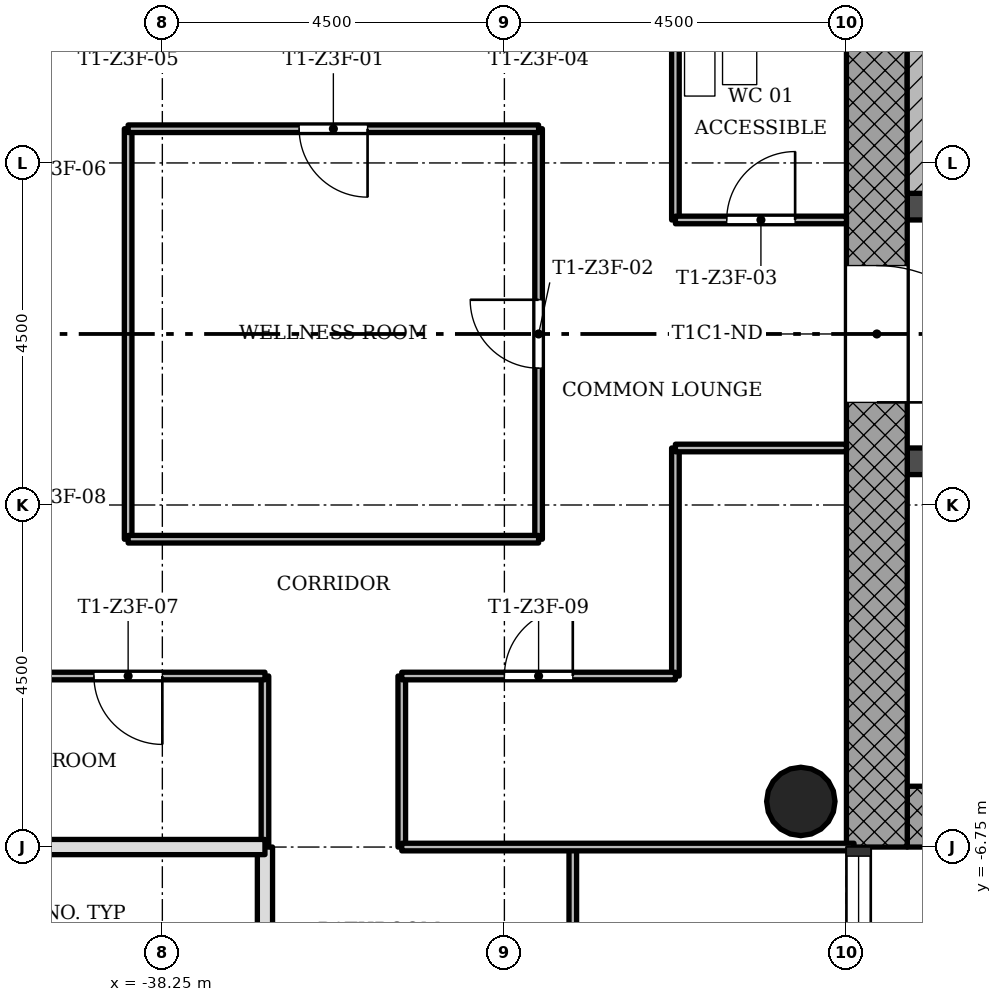
"""IFC4 building model, lengths in metres.
Left out: names, types, materials, properties, quantities, classifications, styles, units other than length and angle.
Written with IfcOpenShell. Run it as: python <this file> out.ifc"""

import sys

from ifc_helpers import new_model, si_unit, direction, frame, frame_2d, origin, origin_2d, place, context, subcontext, project, spatial, rectangle, hollow_circle, extrude, element, fill, save


model = new_model("IFC4")
c1 = context("Model", 3, precision=1e-05, world=origin(), true_north=direction((0.0, 1.0)))
c2 = subcontext(c1, "Body", "Model", "MODEL_VIEW")
j1 = project(units=[si_unit("LENGTHUNIT", "METRE"), si_unit("PLANEANGLEUNIT", "RADIAN")], contexts=[c1])
p1 = place(None, origin())
s1 = spatial("IfcSite", under=j1, at=p1, CompositionType="ELEMENT")
p2 = place(p1, origin())
s2 = spatial("IfcBuilding", under=s1, at=p2, CompositionType="ELEMENT")
p3 = place(p2, frame((0.0, 0.0, 164.3)))
s3 = spatial("IfcBuildingStorey", under=s2, at=p3, CompositionType="ELEMENT", Elevation=164.3)
p4 = place(p3, frame((-28.45, -6.35, 0.0), z_axis=(0.0, 0.0, 1.0), x_axis=(1.0, 0.0, 0.0)))
e1 = element("IfcWall", 1, at=p4, inside=s3, PredefinedType="SHEAR", context=c2, shape_type="SweptSolid", body=[
    extrude(rectangle(XDim=8.2, YDim=0.8, at=frame_2d((4.1, 0.0))), origin(), (0.0, 0.0, 1.0), 3.4),
])
p5 = place(p3, frame((-28.85, 5.95, 0.0), z_axis=(0.0, 0.0, 1.0), x_axis=(0.0, -1.0, 0.0)))
e2 = element("IfcWall", 2, at=p5, inside=s3, PredefinedType="SHEAR", context=c2, shape_type="SweptSolid", body=[
    extrude(rectangle(XDim=12.7, YDim=0.8, at=frame_2d((6.35, 0.0))), origin(), (0.0, 0.0, 1.0), 3.4),
])
p6 = place(p5, frame((5.05, 0.0, 0.0)))
e3 = element("IfcOpeningElement", 3, at=p6, cuts=e2, PredefinedType="OPENING", context=c2, shape_type="SweptSolid", body=[
    extrude(rectangle(XDim=1.8, YDim=2.1, at=frame_2d((0.9, 1.05))), frame((0.0, 0.41, 0.0), z_axis=(0.0, -1.0, 0.0), x_axis=(1.0, 0.0, 0.0)), (0.0, 0.0, 1.0), 0.82),
])
p7 = place(p3, frame((-28.45, -1.675, 0.0), z_axis=(0.0, 0.0, 1.0), x_axis=(1.0, 0.0, 0.0)))
e4 = element("IfcWall", 4, at=p7, inside=s3, PredefinedType="SHEAR", context=c2, shape_type="SweptSolid", body=[
    extrude(rectangle(XDim=7.4, YDim=0.35, at=frame_2d((3.7, 0.0))), origin(), (0.0, 0.0, 1.0), 3.4),
])
p8 = place(p7, frame((0.95, 0.0, 0.0)))
e5 = element("IfcOpeningElement", 5, at=p8, cuts=e4, PredefinedType="OPENING", context=c2, shape_type="SweptSolid", body=[
    extrude(rectangle(XDim=1.1, YDim=2.1, at=frame_2d((0.55, 1.05))), frame((0.0, 0.185, 0.0), z_axis=(0.0, -1.0, 0.0), x_axis=(1.0, 0.0, 0.0)), (0.0, 0.0, 1.0), 0.37),
])
p9 = place(p7, frame((3.15, 0.0, 0.0)))
e6 = element("IfcOpeningElement", 6, at=p9, cuts=e4, PredefinedType="OPENING", context=c2, shape_type="SweptSolid", body=[
    extrude(rectangle(XDim=1.1, YDim=2.1, at=frame_2d((0.55, 1.05))), frame((0.0, 0.185, 0.0), z_axis=(0.0, -1.0, 0.0), x_axis=(1.0, 0.0, 0.0)), (0.0, 0.0, 1.0), 0.37),
])
p10 = place(p7, frame((5.35, 0.0, 0.0)))
e7 = element("IfcOpeningElement", 7, at=p10, cuts=e4, PredefinedType="OPENING", context=c2, shape_type="SweptSolid", body=[
    extrude(rectangle(XDim=1.1, YDim=2.1, at=frame_2d((0.55, 1.05))), frame((0.0, 0.185, 0.0), z_axis=(0.0, -1.0, 0.0), x_axis=(1.0, 0.0, 0.0)), (0.0, 0.0, 1.0), 0.37),
])
p11 = place(p3, frame((-28.45, 1.675, 0.0), z_axis=(0.0, 0.0, 1.0), x_axis=(1.0, 0.0, 0.0)))
e8 = element("IfcWall", 8, at=p11, inside=s3, PredefinedType="SHEAR", context=c2, shape_type="SweptSolid", body=[
    extrude(rectangle(XDim=7.4, YDim=0.35, at=frame_2d((3.7, 0.0))), origin(), (0.0, 0.0, 1.0), 3.4),
])
p12 = place(p11, frame((0.85, 0.0, 0.0)))
e9 = element("IfcOpeningElement", 9, at=p12, cuts=e8, PredefinedType="OPENING", context=c2, shape_type="SweptSolid", body=[
    extrude(rectangle(XDim=0.9, YDim=2.1, at=frame_2d((0.45, 1.05))), frame((0.0, 0.185, 0.0), z_axis=(0.0, -1.0, 0.0), x_axis=(1.0, 0.0, 0.0)), (0.0, 0.0, 1.0), 0.37),
])
p13 = place(p3, frame((-29.85, -6.15, 0.0), z_axis=(0.0, 0.0, 1.0), x_axis=(1.0, 0.0, 0.0)))
e10 = element("IfcColumn", 10, at=p13, inside=s3, PredefinedType="COLUMN", context=c2, shape_type="SweptSolid", body=[
    extrude(hollow_circle(Radius=0.45, WallThickness=0.032, at=origin_2d()), origin(), (0.0, 0.0, 1.0), 3.4),
])
p14 = place(p3, frame((-38.7, -2.7, 0.0), z_axis=(0.0, 0.0, 1.0), x_axis=(0.0, 1.0, 0.0)))
e11 = element("IfcWall", 11, at=p14, inside=s3, PredefinedType="PARTITIONING", context=c2, shape_type="SweptSolid", body=[
    extrude(rectangle(XDim=5.4, YDim=0.1, at=frame_2d((2.7, 0.0))), origin(), (0.0, 0.0, 1.0), 3.0),
])
p15 = place(p3, frame((-36.9, -6.75, 0.0), z_axis=(0.0, 0.0, 1.0), x_axis=(0.0, 1.0, 0.0)))
e12 = element("IfcWall", 12, at=p15, inside=s3, PredefinedType="PARTITIONING", context=c2, shape_type="SweptSolid", body=[
    extrude(rectangle(XDim=2.25, YDim=0.1, at=frame_2d((1.125, 0.0))), origin(), (0.0, 0.0, 1.0), 3.0),
])
p16 = place(p3, frame((-36.9, -8.55, 0.0), z_axis=(0.0, 0.0, 1.0), x_axis=(0.0, 1.0, 0.0)))
e13 = element("IfcWall", 13, at=p16, inside=s3, PredefinedType="SOLIDWALL", context=c2, shape_type="SweptSolid", body=[
    extrude(rectangle(XDim=1.8, YDim=0.2, at=frame_2d((0.9, 0.0))), origin(), (0.0, 0.0, 1.0), 3.0),
])
p17 = place(p3, frame((-35.1, -6.75, 0.0), z_axis=(0.0, 0.0, 1.0), x_axis=(0.0, 1.0, 0.0)))
e14 = element("IfcWall", 14, at=p17, inside=s3, PredefinedType="PARTITIONING", context=c2, shape_type="SweptSolid", body=[
    extrude(rectangle(XDim=2.25, YDim=0.1, at=frame_2d((1.125, 0.0))), origin(), (0.0, 0.0, 1.0), 3.0),
])
p18 = place(p3, frame((-33.3, -2.7, 0.0), z_axis=(0.0, 0.0, 1.0), x_axis=(0.0, 1.0, 0.0)))
e15 = element("IfcWall", 15, at=p18, inside=s3, PredefinedType="PARTITIONING", context=c2, shape_type="SweptSolid", body=[
    extrude(rectangle(XDim=5.4, YDim=0.1, at=frame_2d((2.7, 0.0))), origin(), (0.0, 0.0, 1.0), 3.0),
])
p19 = place(p18, frame((2.25, 0.0, 0.0)))
e16 = element("IfcOpeningElement", 16, at=p19, cuts=e15, PredefinedType="OPENING", context=c2, shape_type="SweptSolid", body=[
    extrude(rectangle(XDim=0.9, YDim=2.1, at=frame_2d((0.45, 1.05))), frame((0.0, 0.06, 0.0), z_axis=(0.0, -1.0, 0.0), x_axis=(1.0, 0.0, 0.0)), (0.0, 0.0, 1.0), 0.12),
])
p20 = place(p3, frame((-32.85, -15.75, 0.0), z_axis=(0.0, 0.0, 1.0), x_axis=(0.0, 1.0, 0.0)))
e17 = element("IfcWall", 17, at=p20, inside=s3, PredefinedType="PARTITIONING", context=c2, shape_type="SweptSolid", body=[
    extrude(rectangle(XDim=9.0, YDim=0.1, at=frame_2d((4.5, 0.0))), origin(), (0.0, 0.0, 1.0), 3.0),
])
p21 = place(p20, frame((6.3, 0.0, 0.0)))
e18 = element("IfcOpeningElement", 18, at=p21, cuts=e17, PredefinedType="OPENING", context=c2, shape_type="SweptSolid", body=[
    extrude(rectangle(XDim=0.9, YDim=2.1, at=frame_2d((0.45, 1.05))), frame((0.0, 0.06, 0.0), z_axis=(0.0, -1.0, 0.0), x_axis=(1.0, 0.0, 0.0)), (0.0, 0.0, 1.0), 0.12),
])
p22 = place(p20, frame((1.8, 0.0, 0.0)))
e19 = element("IfcOpeningElement", 19, at=p22, cuts=e17, PredefinedType="OPENING", context=c2, shape_type="SweptSolid", body=[
    extrude(rectangle(XDim=0.9, YDim=2.1, at=frame_2d((0.45, 1.05))), frame((0.0, 0.06, 0.0), z_axis=(0.0, -1.0, 0.0), x_axis=(1.0, 0.0, 0.0)), (0.0, 0.0, 1.0), 0.12),
])
for number, where, z_axis, x_axis in (
    (20, (-31.5, -4.5, 0.0), (0.0, 0.0, 1.0), (0.0, 1.0, 0.0)),
    (21, (-31.5, 1.5, 0.0), (0.0, 0.0, 1.0), (0.0, 1.0, 0.0)),
):
    element("IfcWall", number, at=place(p3, frame(where, z_axis=z_axis, x_axis=x_axis)), inside=s3, PredefinedType="PARTITIONING", context=c2, shape_type="SweptSolid", body=[
        extrude(rectangle(XDim=3.0, YDim=0.1, at=frame_2d((1.5, 0.0))), origin(), (0.0, 0.0, 1.0), 3.0),
    ])
p23 = place(p3, frame((-35.1, -6.75, 0.0), z_axis=(0.0, 0.0, 1.0), x_axis=(1.0, 0.0, 0.0)))
e22 = element("IfcWall", 22, at=p23, inside=s3, PredefinedType="PARTITIONING", context=c2, shape_type="SweptSolid", body=[
    extrude(rectangle(XDim=5.95, YDim=0.1, at=frame_2d((2.975, 0.0))), origin(), (0.0, 0.0, 1.0), 3.0),
])
p24 = place(p3, frame((-42.85, -6.75, 0.0), z_axis=(0.0, 0.0, 1.0), x_axis=(1.0, 0.0, 0.0)))
e23 = element("IfcWall", 23, at=p24, inside=s3, PredefinedType="SOLIDWALL", context=c2, shape_type="SweptSolid", body=[
    extrude(rectangle(XDim=5.95, YDim=0.2, at=frame_2d((2.975, 0.0))), origin(), (0.0, 0.0, 1.0), 3.0),
])
p25 = place(p3, frame((-42.75, -4.5, 0.0), z_axis=(0.0, 0.0, 1.0), x_axis=(1.0, 0.0, 0.0)))
e24 = element("IfcWall", 24, at=p25, inside=s3, PredefinedType="PARTITIONING", context=c2, shape_type="SweptSolid", body=[
    extrude(rectangle(XDim=5.85, YDim=0.1, at=frame_2d((2.925, 0.0))), origin(), (0.0, 0.0, 1.0), 3.0),
])
p26 = place(p25, frame((3.6, 0.0, 0.0)))
e25 = element("IfcOpeningElement", 25, at=p26, cuts=e24, PredefinedType="OPENING", context=c2, shape_type="SweptSolid", body=[
    extrude(rectangle(XDim=0.9, YDim=2.1, at=frame_2d((0.45, 1.05))), frame((0.0, 0.06, 0.0), z_axis=(0.0, -1.0, 0.0), x_axis=(1.0, 0.0, 0.0)), (0.0, 0.0, 1.0), 0.12),
])
p27 = place(p3, frame((-35.1, -4.5, 0.0), z_axis=(0.0, 0.0, 1.0), x_axis=(1.0, 0.0, 0.0)))
e26 = element("IfcWall", 26, at=p27, inside=s3, PredefinedType="PARTITIONING", context=c2, shape_type="SweptSolid", body=[
    extrude(rectangle(XDim=3.6, YDim=0.1, at=frame_2d((1.8, 0.0))), origin(), (0.0, 0.0, 1.0), 3.0),
])
p28 = place(p27, frame((1.35, 0.0, 0.0)))
e27 = element("IfcOpeningElement", 27, at=p28, cuts=e26, PredefinedType="OPENING", context=c2, shape_type="SweptSolid", body=[
    extrude(rectangle(XDim=0.9, YDim=2.1, at=frame_2d((0.45, 1.05))), frame((0.0, 0.06, 0.0), z_axis=(0.0, -1.0, 0.0), x_axis=(1.0, 0.0, 0.0)), (0.0, 0.0, 1.0), 0.12),
])
p29 = place(p3, frame((-38.7, -2.7, 0.0), z_axis=(0.0, 0.0, 1.0), x_axis=(1.0, 0.0, 0.0)))
e28 = element("IfcWall", 28, at=p29, inside=s3, PredefinedType="PARTITIONING", context=c2, shape_type="SweptSolid", body=[
    extrude(rectangle(XDim=5.4, YDim=0.1, at=frame_2d((2.7, 0.0))), origin(), (0.0, 0.0, 1.0), 3.0),
])
p30 = place(p3, frame((-31.5, -1.5, 0.0), z_axis=(0.0, 0.0, 1.0), x_axis=(1.0, 0.0, 0.0)))
e29 = element("IfcWall", 29, at=p30, inside=s3, PredefinedType="PARTITIONING", context=c2, shape_type="SweptSolid", body=[
    extrude(rectangle(XDim=2.25, YDim=0.1, at=frame_2d((1.125, 0.0))), origin(), (0.0, 0.0, 1.0), 3.0),
])
p31 = place(p3, frame((-31.5, 1.5, 0.0), z_axis=(0.0, 0.0, 1.0), x_axis=(1.0, 0.0, 0.0)))
e30 = element("IfcWall", 30, at=p31, inside=s3, PredefinedType="PARTITIONING", context=c2, shape_type="SweptSolid", body=[
    extrude(rectangle(XDim=2.25, YDim=0.1, at=frame_2d((1.125, 0.0))), origin(), (0.0, 0.0, 1.0), 3.0),
])
p32 = place(p31, frame((0.675, 0.0, 0.0)))
e31 = element("IfcOpeningElement", 31, at=p32, cuts=e30, PredefinedType="OPENING", context=c2, shape_type="SweptSolid", body=[
    extrude(rectangle(XDim=0.9, YDim=2.1, at=frame_2d((0.45, 1.05))), frame((0.0, 0.06, 0.0), z_axis=(0.0, -1.0, 0.0), x_axis=(1.0, 0.0, 0.0)), (0.0, 0.0, 1.0), 0.12),
])
p33 = place(p3, frame((-38.7, 2.7, 0.0), z_axis=(0.0, 0.0, 1.0), x_axis=(1.0, 0.0, 0.0)))
e32 = element("IfcWall", 32, at=p33, inside=s3, PredefinedType="PARTITIONING", context=c2, shape_type="SweptSolid", body=[
    extrude(rectangle(XDim=5.4, YDim=0.1, at=frame_2d((2.7, 0.0))), origin(), (0.0, 0.0, 1.0), 3.0),
])
p34 = place(p33, frame((2.25, 0.0, 0.0)))
e33 = element("IfcOpeningElement", 33, at=p34, cuts=e32, PredefinedType="OPENING", context=c2, shape_type="SweptSolid", body=[
    extrude(rectangle(XDim=0.9, YDim=2.1, at=frame_2d((0.45, 1.05))), frame((0.0, 0.06, 0.0), z_axis=(0.0, -1.0, 0.0), x_axis=(1.0, 0.0, 0.0)), (0.0, 0.0, 1.0), 0.12),
])
p35 = place(p3, frame((-28.25, 1.85, 0.0), z_axis=(0.0, 0.0, 1.0), x_axis=(0.0, 1.0, 0.0)))
e34 = element("IfcWall", 34, at=p35, inside=s3, PredefinedType="SHEAR", context=c2, shape_type="SweptSolid", body=[
    extrude(rectangle(XDim=4.1, YDim=0.4, at=frame_2d((2.05, 0.0))), origin(), (0.0, 0.0, 1.0), 3.4),
])
p36 = place(p34, origin())
e35 = element("IfcDoor", 35, at=p36, inside=s3, OperationType="SINGLE_SWING_RIGHT", PredefinedType="DOOR", context=c2, shape_type="SweptSolid", body=[
    extrude(rectangle(XDim=0.9, YDim=2.1, at=frame_2d((0.45, 1.05))), frame((0.0, 0.025, 0.0), z_axis=(0.0, -1.0, 0.0), x_axis=(1.0, 0.0, 0.0)), (0.0, 0.0, 1.0), 0.05),
])
fill(e33, e35)
p37 = place(p19, origin())
e36 = element("IfcDoor", 36, at=p37, inside=s3, OperationType="SINGLE_SWING_LEFT", PredefinedType="DOOR", context=c2, shape_type="SweptSolid", body=[
    extrude(rectangle(XDim=0.9, YDim=2.1, at=frame_2d((0.45, 1.05))), frame((0.0, 0.025, 0.0), z_axis=(0.0, -1.0, 0.0), x_axis=(1.0, 0.0, 0.0)), (0.0, 0.0, 1.0), 0.05),
])
fill(e16, e36)
p38 = place(p32, origin())
e37 = element("IfcDoor", 37, at=p38, inside=s3, OperationType="SINGLE_SWING_LEFT", PredefinedType="DOOR", context=c2, shape_type="SweptSolid", body=[
    extrude(rectangle(XDim=0.9, YDim=2.1, at=frame_2d((0.45, 1.05))), frame((0.0, 0.025, 0.0), z_axis=(0.0, -1.0, 0.0), x_axis=(1.0, 0.0, 0.0)), (0.0, 0.0, 1.0), 0.05),
])
fill(e31, e37)
p39 = place(p26, origin())
e38 = element("IfcDoor", 38, at=p39, inside=s3, OperationType="SINGLE_SWING_RIGHT", PredefinedType="DOOR", context=c2, shape_type="SweptSolid", body=[
    extrude(rectangle(XDim=0.9, YDim=2.1, at=frame_2d((0.45, 1.05))), frame((0.0, 0.025, 0.0), z_axis=(0.0, -1.0, 0.0), x_axis=(1.0, 0.0, 0.0)), (0.0, 0.0, 1.0), 0.05),
])
fill(e25, e38)
p40 = place(p28, origin())
e39 = element("IfcDoor", 39, at=p40, inside=s3, OperationType="SINGLE_SWING_LEFT", PredefinedType="DOOR", context=c2, shape_type="SweptSolid", body=[
    extrude(rectangle(XDim=0.9, YDim=2.1, at=frame_2d((0.45, 1.05))), frame((0.0, 0.025, 0.0), z_axis=(0.0, -1.0, 0.0), x_axis=(1.0, 0.0, 0.0)), (0.0, 0.0, 1.0), 0.05),
])
fill(e27, e39)
p41 = place(p6, origin())
e40 = element("IfcDoor", 40, at=p41, inside=s3, OperationType="SINGLE_SWING_LEFT", PredefinedType="DOOR", context=c2, shape_type="SweptSolid", body=[
    extrude(rectangle(XDim=1.8, YDim=2.1, at=frame_2d((0.9, 1.05))), frame((0.0, 0.025, 0.0), z_axis=(0.0, -1.0, 0.0), x_axis=(1.0, 0.0, 0.0)), (0.0, 0.0, 1.0), 0.05),
])
fill(e3, e40)
save(model, sys.argv[1])
